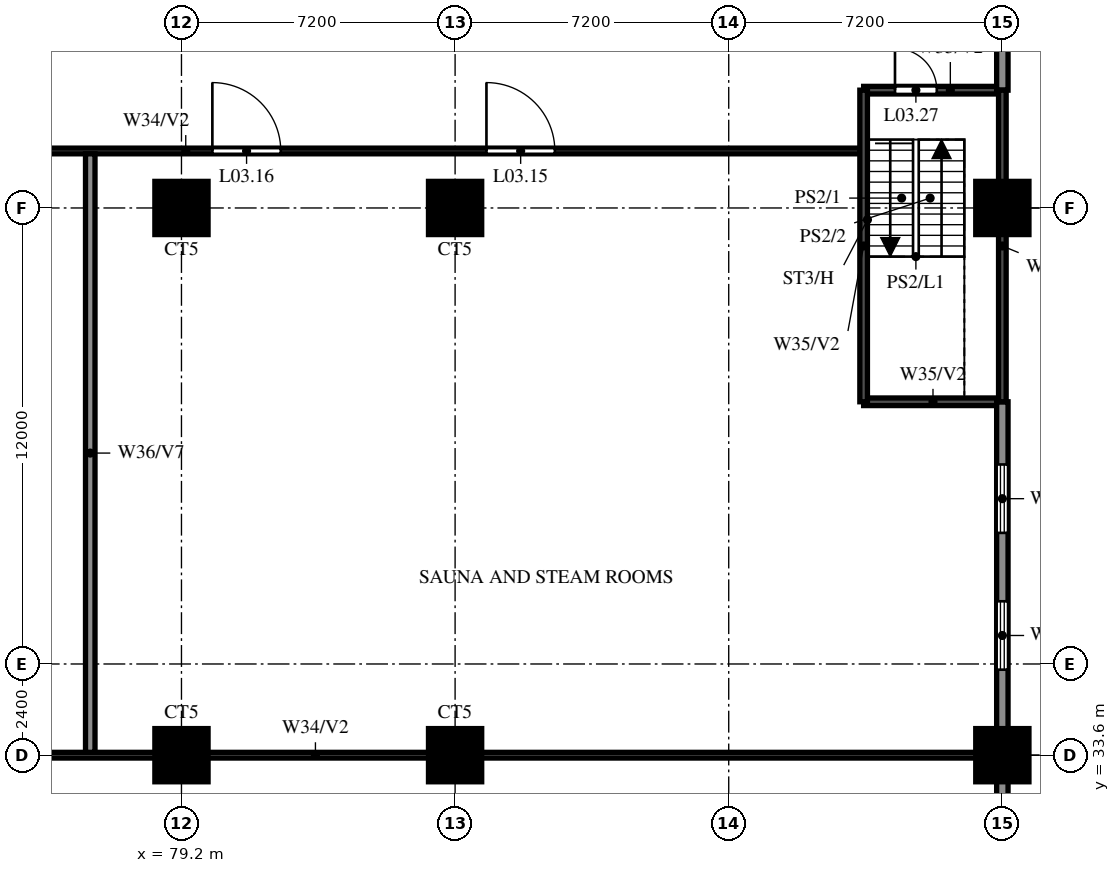
"""IFC4 building model, lengths in metres.
Left out: names, types, materials, properties, quantities, classifications, styles, units other than length and angle.
Written with IfcOpenShell. Run it as: python <this file> out.ifc"""

import sys

from ifc_helpers import new_model, si_unit, direction, frame, frame_2d, origin, origin_2d, place, context, subcontext, project, spatial, rectangle, circle, extrude, source, transform, mapped, element, fill, save


model = new_model("IFC4")
c1 = context("Model", 3, precision=1e-05, world=origin(), true_north=direction((0.0, 1.0)))
c2 = subcontext(c1, "Body", "Model", "MODEL_VIEW")
j1 = project(units=[si_unit("LENGTHUNIT", "METRE"), si_unit("PLANEANGLEUNIT", "RADIAN")], contexts=[c1])
p1 = place(None, origin())
s1 = spatial("IfcSite", under=j1, at=p1, CompositionType="ELEMENT")
p2 = place(p1, origin())
s2 = spatial("IfcBuilding", under=s1, at=p2, CompositionType="ELEMENT")
p3 = place(p2, frame((0.0, 0.0, 17.4)))
s3 = spatial("IfcBuildingStorey", under=s2, at=p3, CompositionType="ELEMENT", Elevation=17.4)
m1 = source(origin(), c2, "Body", "SweptSolid", [
    extrude(circle(Radius=0.7, at=origin_2d()), origin(), (0.0, 0.0, 1.0), 3.8),
])
for number, where, z_axis, x_axis in (
    (1, (79.2, 33.6, 0.0), (0.0, 0.0, 1.0), (1.0, 0.0, 0.0)),
    (2, (86.4, 33.6, 0.0), (0.0, 0.0, 1.0), (1.0, 0.0, 0.0)),
    (3, (100.8, 33.6, 0.0), (0.0, 0.0, 1.0), (1.0, 0.0, 0.0)),
    (4, (79.2, 48.0, 0.0), (0.0, 0.0, 1.0), (1.0, 0.0, 0.0)),
    (5, (86.4, 48.0, 0.0), (0.0, 0.0, 1.0), (1.0, 0.0, 0.0)),
    (6, (100.8, 48.0, 0.0), (0.0, 0.0, 1.0), (1.0, 0.0, 0.0)),
):
    element("IfcColumn", number, at=place(p3, frame(where, z_axis=z_axis, x_axis=x_axis)), inside=s3, PredefinedType="COLUMN", context=c2, shape_type="MappedRepresentation", body=[
        mapped(m1, transform((0.0, 0.0, 0.0))),
    ])
p4 = place(p3, frame((64.8, 33.6, 0.0), z_axis=(0.0, 0.0, 1.0), x_axis=(1.0, 0.0, 0.0)))
e7 = element("IfcWall", 7, at=p4, inside=s3, PredefinedType="PARTITIONING", context=c2, shape_type="SweptSolid", body=[
    extrude(rectangle(XDim=35.85, YDim=0.15, at=frame_2d((17.925, 0.0))), origin(), (0.0, 0.0, 1.0), 2.6),
])
p5 = place(p3, frame((97.15, 42.9, 0.0), z_axis=(0.0, 0.0, 1.0), x_axis=(1.0, 0.0, 0.0)))
e8 = element("IfcWall", 8, at=p5, inside=s3, PredefinedType="SOLIDWALL", context=c2, shape_type="SweptSolid", body=[
    extrude(rectangle(XDim=3.65, YDim=0.2, at=frame_2d((1.825, 0.0))), origin(), (0.0, 0.0, 1.0), 3.8),
])
p6 = place(p3, frame((64.8, 49.5, 0.0), z_axis=(0.0, 0.0, 1.0), x_axis=(1.0, 0.0, 0.0)))
e9 = element("IfcWall", 9, at=p6, inside=s3, PredefinedType="PARTITIONING", context=c2, shape_type="SweptSolid", body=[
    extrude(rectangle(XDim=32.25, YDim=0.15, at=frame_2d((16.125, 0.0))), origin(), (0.0, 0.0, 1.0), 2.6),
])
p7 = place(p6, frame((2.45, 0.0, 0.0)))
e10 = element("IfcOpeningElement", 10, at=p7, cuts=e9, PredefinedType="OPENING", context=c2, shape_type="SweptSolid", body=[
    extrude(rectangle(XDim=1.1, YDim=2.1, at=frame_2d((0.55, 1.05))), frame((0.0, 0.085, 0.0), z_axis=(0.0, -1.0, 0.0), x_axis=(1.0, 0.0, 0.0)), (0.0, 0.0, 1.0), 0.17),
])
p8 = place(p6, frame((8.45, 0.0, 0.0)))
e11 = element("IfcOpeningElement", 11, at=p8, cuts=e9, PredefinedType="OPENING", context=c2, shape_type="SweptSolid", body=[
    extrude(rectangle(XDim=1.1, YDim=2.1, at=frame_2d((0.55, 1.05))), frame((0.0, 0.085, 0.0), z_axis=(0.0, -1.0, 0.0), x_axis=(1.0, 0.0, 0.0)), (0.0, 0.0, 1.0), 0.17),
])
p9 = place(p6, frame((22.425, 0.0, 0.0)))
e12 = element("IfcOpeningElement", 12, at=p9, cuts=e9, PredefinedType="OPENING", context=c2, shape_type="SweptSolid", body=[
    extrude(rectangle(XDim=1.8, YDim=2.1, at=frame_2d((0.9, 1.05))), frame((0.0, 0.085, 0.0), z_axis=(0.0, -1.0, 0.0), x_axis=(1.0, 0.0, 0.0)), (0.0, 0.0, 1.0), 0.17),
])
p10 = place(p6, frame((15.213, 0.0, 0.0)))
e13 = element("IfcOpeningElement", 13, at=p10, cuts=e9, PredefinedType="OPENING", context=c2, shape_type="SweptSolid", body=[
    extrude(rectangle(XDim=1.8, YDim=2.1, at=frame_2d((0.9, 1.05))), frame((0.0, 0.085, 0.0), z_axis=(0.0, -1.0, 0.0), x_axis=(1.0, 0.0, 0.0)), (0.0, 0.0, 1.0), 0.17),
])
p11 = place(p3, frame((97.15, 51.1, 0.0), z_axis=(0.0, 0.0, 1.0), x_axis=(1.0, 0.0, 0.0)))
e14 = element("IfcWall", 14, at=p11, inside=s3, PredefinedType="SOLIDWALL", context=c2, shape_type="SweptSolid", body=[
    extrude(rectangle(XDim=3.65, YDim=0.2, at=frame_2d((1.825, 0.0))), origin(), (0.0, 0.0, 1.0), 3.8),
])
p12 = place(p11, frame((0.825, 0.0, 0.0)))
e15 = element("IfcOpeningElement", 15, at=p12, cuts=e14, PredefinedType="OPENING", context=c2, shape_type="SweptSolid", body=[
    extrude(rectangle(XDim=1.1, YDim=2.1, at=frame_2d((0.55, 1.05))), frame((0.0, 0.11, 0.0), z_axis=(0.0, -1.0, 0.0), x_axis=(1.0, 0.0, 0.0)), (0.0, 0.0, 1.0), 0.22),
])
p13 = place(p3, frame((76.8, 33.675, 0.0), z_axis=(0.0, 0.0, 1.0), x_axis=(0.0, 1.0, 0.0)))
e16 = element("IfcWall", 16, at=p13, inside=s3, PredefinedType="SOLIDWALL", context=c2, shape_type="SweptSolid", body=[
    extrude(rectangle(XDim=15.75, YDim=0.25, at=frame_2d((7.875, 0.0))), origin(), (0.0, 0.0, 1.0), 2.9),
])
p14 = place(p3, frame((97.15, 42.9, 0.0), z_axis=(0.0, 0.0, 1.0), x_axis=(0.0, 1.0, 0.0)))
e17 = element("IfcWall", 17, at=p14, inside=s3, PredefinedType="SOLIDWALL", context=c2, shape_type="SweptSolid", body=[
    extrude(rectangle(XDim=8.2, YDim=0.2, at=frame_2d((4.1, 0.0))), origin(), (0.0, 0.0, 1.0), 3.8),
])
p15 = place(p3, frame((100.8, 9.6, 0.0), z_axis=(0.0, 0.0, 1.0), x_axis=(0.0, 1.0, 0.0)))
e18 = element("IfcWall", 18, at=p15, inside=s3, PredefinedType="SOLIDWALL", context=c2, shape_type="SweptSolid", body=[
    extrude(rectangle(XDim=33.3, YDim=0.3, at=frame_2d((16.65, 0.0))), origin(), (0.0, 0.0, 1.0), 3.8),
])
p16 = place(p15, frame((1.05, 0.0, 0.6)))
e19 = element("IfcOpeningElement", 19, at=p16, cuts=e18, PredefinedType="OPENING", context=c2, shape_type="SweptSolid", body=[
    extrude(rectangle(XDim=1.8, YDim=2.4, at=frame_2d((0.9, 1.2))), frame((0.0, 0.16, 0.0), z_axis=(0.0, -1.0, 0.0), x_axis=(1.0, 0.0, 0.0)), (0.0, 0.0, 1.0), 0.32),
])
p17 = place(p15, frame((4.65, 0.0, 0.6)))
e20 = element("IfcOpeningElement", 20, at=p17, cuts=e18, PredefinedType="OPENING", context=c2, shape_type="SweptSolid", body=[
    extrude(rectangle(XDim=1.8, YDim=2.4, at=frame_2d((0.9, 1.2))), frame((0.0, 0.16, 0.0), z_axis=(0.0, -1.0, 0.0), x_axis=(1.0, 0.0, 0.0)), (0.0, 0.0, 1.0), 0.32),
])
p18 = place(p15, frame((11.85, 0.0, 0.6)))
e21 = element("IfcOpeningElement", 21, at=p18, cuts=e18, PredefinedType="OPENING", context=c2, shape_type="SweptSolid", body=[
    extrude(rectangle(XDim=1.8, YDim=2.4, at=frame_2d((0.9, 1.2))), frame((0.0, 0.16, 0.0), z_axis=(0.0, -1.0, 0.0), x_axis=(1.0, 0.0, 0.0)), (0.0, 0.0, 1.0), 0.32),
])
p19 = place(p15, frame((15.45, 0.0, 0.6)))
e22 = element("IfcOpeningElement", 22, at=p19, cuts=e18, PredefinedType="OPENING", context=c2, shape_type="SweptSolid", body=[
    extrude(rectangle(XDim=1.8, YDim=2.4, at=frame_2d((0.9, 1.2))), frame((0.0, 0.16, 0.0), z_axis=(0.0, -1.0, 0.0), x_axis=(1.0, 0.0, 0.0)), (0.0, 0.0, 1.0), 0.32),
])
p20 = place(p15, frame((26.25, 0.0, 0.6)))
e23 = element("IfcOpeningElement", 23, at=p20, cuts=e18, PredefinedType="OPENING", context=c2, shape_type="SweptSolid", body=[
    extrude(rectangle(XDim=1.8, YDim=2.4, at=frame_2d((0.9, 1.2))), frame((0.0, 0.16, 0.0), z_axis=(0.0, -1.0, 0.0), x_axis=(1.0, 0.0, 0.0)), (0.0, 0.0, 1.0), 0.32),
])
p21 = place(p15, frame((29.85, 0.0, 0.6)))
e24 = element("IfcOpeningElement", 24, at=p21, cuts=e18, PredefinedType="OPENING", context=c2, shape_type="SweptSolid", body=[
    extrude(rectangle(XDim=1.8, YDim=2.4, at=frame_2d((0.9, 1.2))), frame((0.0, 0.16, 0.0), z_axis=(0.0, -1.0, 0.0), x_axis=(1.0, 0.0, 0.0)), (0.0, 0.0, 1.0), 0.32),
])
p22 = place(p3, frame((100.8, 51.1, 0.0), z_axis=(0.0, 0.0, 1.0), x_axis=(0.0, 1.0, 0.0)))
e25 = element("IfcWall", 25, at=p22, inside=s3, PredefinedType="SOLIDWALL", context=c2, shape_type="SweptSolid", body=[
    extrude(rectangle(XDim=3.2, YDim=0.3, at=frame_2d((1.6, 0.0))), origin(), (0.0, 0.0, 1.0), 3.8),
])
p23 = place(p3, frame((100.8, 42.9, 0.0), z_axis=(0.0, 0.0, 1.0), x_axis=(0.0, 1.0, 0.0)))
e26 = element("IfcWall", 26, at=p23, inside=s3, PredefinedType="SOLIDWALL", context=c2, shape_type="SweptSolid", body=[
    extrude(rectangle(XDim=8.2, YDim=0.2, at=frame_2d((4.1, 0.0))), origin(), (0.0, 0.0, 1.0), 3.8),
])
p24 = place(p9, origin())
e27 = element("IfcDoor", 27, at=p24, inside=s3, OperationType="DOUBLE_DOOR_SINGLE_SWING", PredefinedType="DOOR", context=c2, shape_type="SweptSolid", body=[
    extrude(rectangle(XDim=1.8, YDim=2.1, at=frame_2d((0.9, 1.05))), frame((0.0, 0.025, 0.0), z_axis=(0.0, -1.0, 0.0), x_axis=(1.0, 0.0, 0.0)), (0.0, 0.0, 1.0), 0.05),
])
fill(e12, e27)
p25 = place(p10, origin())
e28 = element("IfcDoor", 28, at=p25, inside=s3, OperationType="DOUBLE_DOOR_SINGLE_SWING", PredefinedType="DOOR", context=c2, shape_type="SweptSolid", body=[
    extrude(rectangle(XDim=1.8, YDim=2.1, at=frame_2d((0.9, 1.05))), frame((0.0, 0.025, 0.0), z_axis=(0.0, -1.0, 0.0), x_axis=(1.0, 0.0, 0.0)), (0.0, 0.0, 1.0), 0.05),
])
fill(e13, e28)
p26 = place(p12, origin())
e29 = element("IfcDoor", 29, at=p26, inside=s3, OperationType="SINGLE_SWING_LEFT", PredefinedType="DOOR", context=c2, shape_type="SweptSolid", body=[
    extrude(rectangle(XDim=1.1, YDim=2.1, at=frame_2d((0.55, 1.05))), frame((0.0, 0.025, 0.0), z_axis=(0.0, -1.0, 0.0), x_axis=(1.0, 0.0, 0.0)), (0.0, 0.0, 1.0), 0.05),
])
fill(e15, e29)
p27 = place(p20, origin())
e30 = element("IfcWindow", 30, at=p27, inside=s3, PartitioningType="DOUBLE_PANEL_VERTICAL", PredefinedType="WINDOW", context=c2, shape_type="SweptSolid", body=[
    extrude(rectangle(XDim=1.8, YDim=2.4, at=frame_2d((0.9, 1.2))), frame((0.0, 0.03, 0.0), z_axis=(0.0, -1.0, 0.0), x_axis=(1.0, 0.0, 0.0)), (0.0, 0.0, 1.0), 0.06),
])
fill(e23, e30)
p28 = place(p21, origin())
e31 = element("IfcWindow", 31, at=p28, inside=s3, PartitioningType="DOUBLE_PANEL_VERTICAL", PredefinedType="WINDOW", context=c2, shape_type="SweptSolid", body=[
    extrude(rectangle(XDim=1.8, YDim=2.4, at=frame_2d((0.9, 1.2))), frame((0.0, 0.03, 0.0), z_axis=(0.0, -1.0, 0.0), x_axis=(1.0, 0.0, 0.0)), (0.0, 0.0, 1.0), 0.06),
])
fill(e24, e31)
save(model, sys.argv[1])
